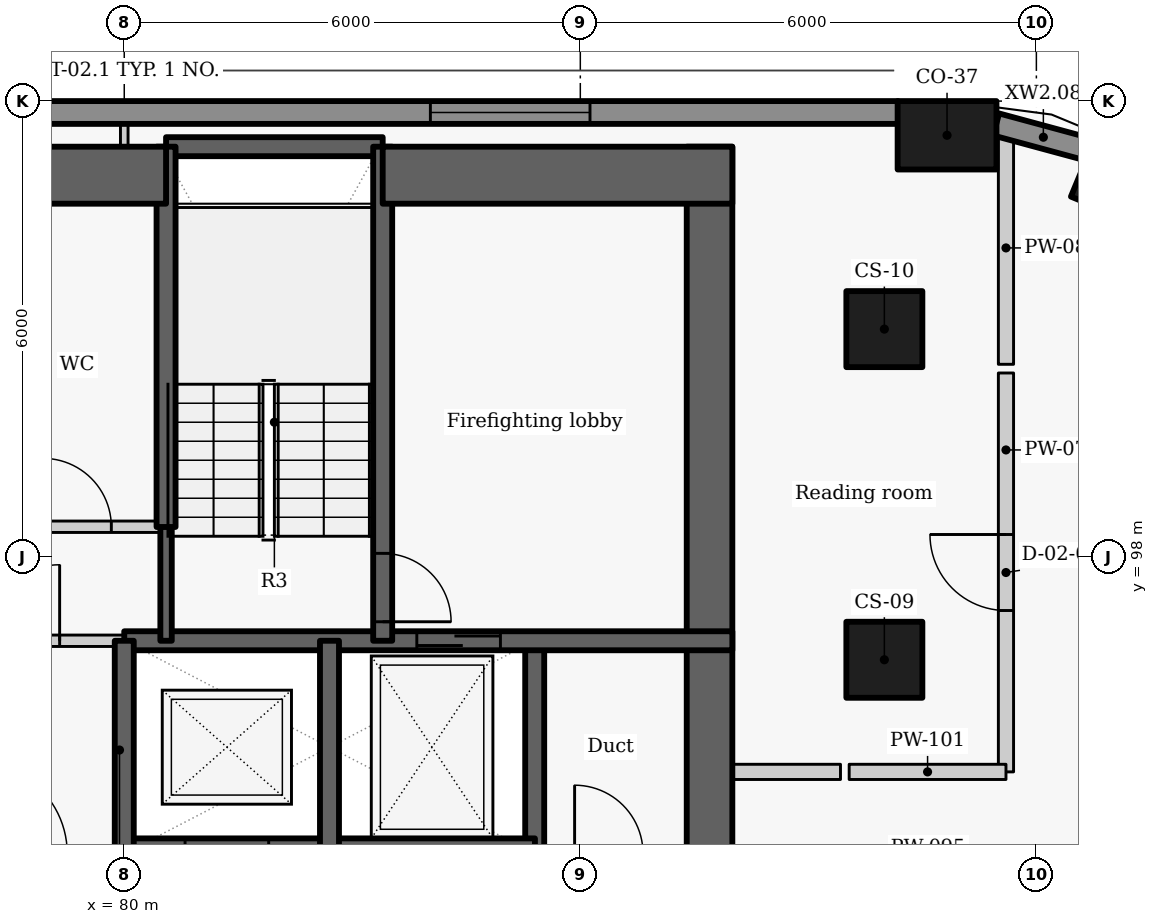
"""IFC4 building model, lengths in metres.
Left out: names, types, materials, properties, quantities, classifications, styles, units other than length and angle.
Written with IfcOpenShell. Run it as: python <this file> out.ifc"""

import sys

from ifc_helpers import new_model, si_unit, direction, frame, frame_2d, origin, origin_2d, place, context, subcontext, project, spatial, rectangle, extrude, element, fill, save


model = new_model("IFC4")
c1 = context("Model", 3, precision=1e-05, world=origin(), true_north=direction((0.0, 1.0)))
c2 = subcontext(c1, "Body", "Model", "MODEL_VIEW")
j1 = project(units=[si_unit("LENGTHUNIT", "METRE"), si_unit("PLANEANGLEUNIT", "RADIAN")], contexts=[c1])
p1 = place(None, origin())
s1 = spatial("IfcSite", under=j1, at=p1, CompositionType="ELEMENT")
p2 = place(p1, origin())
s2 = spatial("IfcBuilding", under=s1, at=p2, CompositionType="ELEMENT")
p3 = place(p2, frame((0.0, 0.0, 166.8)))
s3 = spatial("IfcBuildingStorey", under=s2, at=p3, CompositionType="ELEMENT", Elevation=166.8)
for number, where, z_axis, x_axis in (
    (1, (93.227, 102.91, 0.0), (0.0, 0.0, 1.0), (-0.924, 0.383, 0.0)),
    (2, (90.825, 103.55, 0.0), (0.0, 0.0, 1.0), (-1.0, 0.0, 0.0)),
):
    element("IfcColumn", number, at=place(p3, frame(where, z_axis=z_axis, x_axis=x_axis)), inside=s3, PredefinedType="COLUMN", context=c2, shape_type="SweptSolid", body=[
        extrude(rectangle(XDim=1.3, YDim=0.9, at=origin_2d()), origin(), (0.0, 0.0, 1.0), 3.3),
    ])
for number, where, z_axis, x_axis in (
    (3, (90.0, 96.65, 0.0), (0.0, 0.0, 1.0), (0.0, 1.0, 0.0)),
    (4, (90.0, 101.0, 0.0), (0.0, 0.0, 1.0), (0.0, 1.0, 0.0)),
):
    element("IfcColumn", number, at=place(p3, frame(where, z_axis=z_axis, x_axis=x_axis)), inside=s3, PredefinedType="COLUMN", context=c2, shape_type="SweptSolid", body=[
        extrude(rectangle(XDim=1.0, YDim=1.0, at=origin_2d()), origin(), (0.0, 0.0, 1.0), 3.3),
    ])
p4 = place(p3, frame((92.713, 103.356, 0.0), z_axis=(0.0, 0.0, 1.0), x_axis=(-0.965274225809, 0.26123872031, 0.0)))
e5 = element("IfcWall", 5, at=p4, inside=s3, PredefinedType="SOLIDWALL", context=c2, shape_type="SweptSolid", body=[
    extrude(rectangle(XDim=1.287, YDim=0.3, at=frame_2d((0.644, 0.0))), origin(), (0.0, 0.0, 1.0), 2.05),
])
p5 = place(p3, frame((90.179, 103.85, 0.0), z_axis=(0.0, 0.0, 1.0), x_axis=(-1.0, 0.0, 0.0)))
e6 = element("IfcWall", 6, at=p5, inside=s3, PredefinedType="SOLIDWALL", context=c2, shape_type="SweptSolid", body=[
    extrude(rectangle(XDim=20.391, YDim=0.3, at=frame_2d((10.196, 0.0))), origin(), (0.0, 0.0, 1.0), 2.05),
])
p6 = place(p5, frame((4.051, 0.0, 0.9)))
e7 = element("IfcOpeningElement", 7, at=p6, cuts=e6, PredefinedType="OPENING", context=c2, shape_type="SweptSolid", body=[
    extrude(rectangle(XDim=2.1, YDim=1.1, at=frame_2d((1.05, 0.55))), frame((0.0, 0.16, 0.0), z_axis=(0.0, -1.0, 0.0), x_axis=(1.0, 0.0, 0.0)), (0.0, 0.0, 1.0), 0.32),
])
p7 = place(p5, frame((14.212, 0.0, 0.9)))
e8 = element("IfcOpeningElement", 8, at=p7, cuts=e6, PredefinedType="OPENING", context=c2, shape_type="SweptSolid", body=[
    extrude(rectangle(XDim=2.1, YDim=1.1, at=frame_2d((1.05, 0.55))), frame((0.0, 0.16, 0.0), z_axis=(0.0, -1.0, 0.0), x_axis=(1.0, 0.0, 0.0)), (0.0, 0.0, 1.0), 0.32),
])
p8 = place(p3, frame((85.4, 94.1, -0.275), z_axis=(0.0, 0.0, 1.0), x_axis=(0.0, 1.0, 0.0)))
e9 = element("IfcWall", 9, at=p8, inside=s3, PredefinedType="SHEAR", context=c2, shape_type="SweptSolid", body=[
    extrude(rectangle(XDim=2.8, YDim=0.25, at=frame_2d((1.4, 0.0))), origin(), (0.0, 0.0, 1.0), 3.225),
])
p9 = place(p3, frame((87.7, 103.4, -0.275), z_axis=(0.0, 0.0, 1.0), x_axis=(0.0, -1.0, 0.0)))
e10 = element("IfcWall", 10, at=p9, inside=s3, PredefinedType="SHEAR", context=c2, shape_type="SweptSolid", body=[
    extrude(rectangle(XDim=15.6, YDim=0.6, at=frame_2d((7.8, 0.0))), origin(), (0.0, 0.0, 1.0), 3.225),
])
p10 = place(p9, frame((10.248, 0.0, 0.275)))
e11 = element("IfcOpeningElement", 11, at=p10, cuts=e10, PredefinedType="OPENING", context=c2, shape_type="SweptSolid", body=[
    extrude(rectangle(XDim=1.5, YDim=2.1, at=frame_2d((0.75, 1.05))), frame((0.0, 0.31, 0.0), z_axis=(0.0, -1.0, 0.0), x_axis=(1.0, 0.0, 0.0)), (0.0, 0.0, 1.0), 0.62),
])
p11 = place(p3, frame((79.997, 94.1, -0.275), z_axis=(0.0, 0.0, 1.0), x_axis=(1.0, 0.0, 0.0)))
e12 = element("IfcWall", 12, at=p11, inside=s3, PredefinedType="SHEAR", context=c2, shape_type="SweptSolid", body=[
    extrude(rectangle(XDim=5.406, YDim=0.4, at=frame_2d((2.703, 0.0))), origin(), (0.0, 0.0, 1.0), 3.225),
])
p12 = place(p11, frame((0.803, 0.0, 0.275)))
e13 = element("IfcOpeningElement", 13, at=p12, cuts=e12, PredefinedType="OPENING", context=c2, shape_type="SweptSolid", body=[
    extrude(rectangle(XDim=1.1, YDim=2.1, at=frame_2d((0.55, 1.05))), frame((0.0, 0.21, 0.0), z_axis=(0.0, -1.0, 0.0), x_axis=(1.0, 0.0, 0.0)), (0.0, 0.0, 1.0), 0.42),
])
p13 = place(p3, frame((80.0, 96.9, -0.275), z_axis=(0.0, 0.0, 1.0), x_axis=(1.0, 0.0, 0.0)))
e14 = element("IfcWall", 14, at=p13, inside=s3, PredefinedType="SHEAR", context=c2, shape_type="SweptSolid", body=[
    extrude(rectangle(XDim=8.0, YDim=0.25, at=frame_2d((4.0, 0.0))), origin(), (0.0, 0.0, 1.0), 3.225),
])
p14 = place(p13, frame((3.849, 0.0, 0.275)))
e15 = element("IfcOpeningElement", 15, at=p14, cuts=e14, PredefinedType="OPENING", context=c2, shape_type="SweptSolid", body=[
    extrude(rectangle(XDim=1.1, YDim=2.1, at=frame_2d((0.55, 1.05))), frame((0.0, 0.135, 0.0), z_axis=(0.0, -1.0, 0.0), x_axis=(1.0, 0.0, 0.0)), (0.0, 0.0, 1.0), 0.27),
])
p15 = place(p3, frame((80.0, 94.1, -0.275), z_axis=(0.0, 0.0, 1.0), x_axis=(0.0, 1.0, 0.0)))
e16 = element("IfcWall", 16, at=p15, inside=s3, PredefinedType="SHEAR", context=c2, shape_type="SweptSolid", body=[
    extrude(rectangle(XDim=2.8, YDim=0.25, at=frame_2d((1.4, 0.0))), origin(), (0.0, 0.0, 1.0), 3.225),
])
p16 = place(p3, frame((77.3, 96.9, 0.0), z_axis=(0.0, 0.0, 1.0), x_axis=(1.0, 0.0, 0.0)))
e17 = element("IfcWall", 17, at=p16, inside=s3, PredefinedType="PARTITIONING", context=c2, shape_type="SweptSolid", body=[
    extrude(rectangle(XDim=2.7, YDim=0.15, at=frame_2d((1.35, 0.0))), origin(), (0.0, 0.0, 1.0), 2.95),
])
p17 = place(p16, frame((0.85, 0.0, 0.0)))
e18 = element("IfcOpeningElement", 18, at=p17, cuts=e17, PredefinedType="OPENING", context=c2, shape_type="SweptSolid", body=[
    extrude(rectangle(XDim=1.0, YDim=2.1, at=frame_2d((0.5, 1.05))), frame((0.0, 0.085, 0.0), z_axis=(0.0, -1.0, 0.0), x_axis=(1.0, 0.0, 0.0)), (0.0, 0.0, 1.0), 0.17),
])
p18 = place(p3, frame((82.7, 94.1, -0.275), z_axis=(0.0, 0.0, 1.0), x_axis=(0.0, 1.0, 0.0)))
e19 = element("IfcWall", 19, at=p18, inside=s3, PredefinedType="SHEAR", context=c2, shape_type="SweptSolid", body=[
    extrude(rectangle(XDim=2.8, YDim=0.25, at=frame_2d((1.4, 0.0))), origin(), (0.0, 0.0, 1.0), 3.225),
])
p19 = place(p3, frame((80.55, 103.4, -0.275), z_axis=(0.0, 0.0, 1.0), x_axis=(1.0, 0.0, 0.0)))
e20 = element("IfcWall", 20, at=p19, inside=s3, PredefinedType="SHEAR", context=c2, shape_type="SweptSolid", body=[
    extrude(rectangle(XDim=2.85, YDim=0.25, at=frame_2d((1.425, 0.0))), origin(), (0.0, 0.0, 1.0), 3.225),
])
p20 = place(p3, frame((83.4, 103.4, -0.275), z_axis=(0.0, 0.0, 1.0), x_axis=(0.0, -1.0, 0.0)))
e21 = element("IfcWall", 21, at=p20, inside=s3, PredefinedType="SHEAR", context=c2, shape_type="SweptSolid", body=[
    extrude(rectangle(XDim=6.5, YDim=0.25, at=frame_2d((3.25, 0.0))), origin(), (0.0, 0.0, 1.0), 3.225),
])
p21 = place(p20, frame((5.35, 0.0, 0.275)))
e22 = element("IfcOpeningElement", 22, at=p21, cuts=e21, PredefinedType="OPENING", context=c2, shape_type="SweptSolid", body=[
    extrude(rectangle(XDim=0.9, YDim=2.1, at=frame_2d((0.45, 1.05))), frame((0.0, 0.135, 0.0), z_axis=(0.0, -1.0, 0.0), x_axis=(1.0, 0.0, 0.0)), (0.0, 0.0, 1.0), 0.27),
])
p22 = place(p3, frame((80.55, 96.9, -0.275), z_axis=(0.0, 0.0, 1.0), x_axis=(0.0, 1.0, 0.0)))
e23 = element("IfcWall", 23, at=p22, inside=s3, PredefinedType="SHEAR", context=c2, shape_type="SweptSolid", body=[
    extrude(rectangle(XDim=1.503, YDim=0.15, at=frame_2d((0.751, 0.0))), origin(), (0.0, 0.0, 1.0), 3.225),
])
p23 = place(p3, frame((80.55, 98.397, -0.275), z_axis=(0.0, 0.0, 1.0), x_axis=(0.0, 1.0, 0.0)))
e24 = element("IfcWall", 24, at=p23, inside=s3, PredefinedType="SHEAR", context=c2, shape_type="SweptSolid", body=[
    extrude(rectangle(XDim=5.003, YDim=0.25, at=frame_2d((2.501, 0.0))), origin(), (0.0, 0.0, 1.0), 3.225),
])
p24 = place(p3, frame((75.35, 103.025, -0.275), z_axis=(0.0, 0.0, 1.0), x_axis=(1.0, 0.0, 0.0)))
e25 = element("IfcWall", 25, at=p24, inside=s3, PredefinedType="SHEAR", context=c2, shape_type="SweptSolid", body=[
    extrude(rectangle(XDim=5.2, YDim=0.75, at=frame_2d((2.6, 0.0))), origin(), (0.0, 0.0, 1.0), 3.225),
])
p25 = place(p3, frame((83.4, 103.025, -0.275), z_axis=(0.0, 0.0, 1.0), x_axis=(1.0, 0.0, 0.0)))
e26 = element("IfcWall", 26, at=p25, inside=s3, PredefinedType="SHEAR", context=c2, shape_type="SweptSolid", body=[
    extrude(rectangle(XDim=4.6, YDim=0.75, at=frame_2d((2.3, 0.0))), origin(), (0.0, 0.0, 1.0), 3.225),
])
p26 = place(p3, frame((75.35, 98.4, 0.0), z_axis=(0.0, 0.0, 1.0), x_axis=(1.0, 0.0, 0.0)))
e27 = element("IfcWall", 27, at=p26, inside=s3, PredefinedType="PARTITIONING", context=c2, shape_type="SweptSolid", body=[
    extrude(rectangle(XDim=5.2, YDim=0.15, at=frame_2d((2.6, 0.0))), origin(), (0.0, 0.0, 1.0), 2.95),
])
p27 = place(p26, frame((0.2, 0.0, 0.0)))
e28 = element("IfcOpeningElement", 28, at=p27, cuts=e27, PredefinedType="OPENING", context=c2, shape_type="SweptSolid", body=[
    extrude(rectangle(XDim=0.9, YDim=2.1, at=frame_2d((0.45, 1.05))), frame((0.0, 0.085, 0.0), z_axis=(0.0, -1.0, 0.0), x_axis=(1.0, 0.0, 0.0)), (0.0, 0.0, 1.0), 0.17),
])
p28 = place(p26, frame((1.63, 0.0, 0.0)))
e29 = element("IfcOpeningElement", 29, at=p28, cuts=e27, PredefinedType="OPENING", context=c2, shape_type="SweptSolid", body=[
    extrude(rectangle(XDim=0.9, YDim=2.1, at=frame_2d((0.45, 1.05))), frame((0.0, 0.085, 0.0), z_axis=(0.0, -1.0, 0.0), x_axis=(1.0, 0.0, 0.0)), (0.0, 0.0, 1.0), 0.17),
])
p29 = place(p26, frame((3.58, 0.0, 0.0)))
e30 = element("IfcOpeningElement", 30, at=p29, cuts=e27, PredefinedType="OPENING", context=c2, shape_type="SweptSolid", body=[
    extrude(rectangle(XDim=0.9, YDim=2.1, at=frame_2d((0.45, 1.05))), frame((0.0, 0.085, 0.0), z_axis=(0.0, -1.0, 0.0), x_axis=(1.0, 0.0, 0.0)), (0.0, 0.0, 1.0), 0.17),
])
p30 = place(p3, frame((91.6, 95.175, 0.0), z_axis=(0.0, 0.0, 1.0), x_axis=(0.0, 1.0, 0.0)))
e31 = element("IfcWall", 31, at=p30, inside=s3, PredefinedType="PARTITIONING", context=c2, shape_type="SweptSolid", body=[
    extrude(rectangle(XDim=5.248, YDim=0.2, at=frame_2d((2.624, 0.0))), origin(), (0.0, 0.0, 1.0), 2.95),
])
p31 = place(p30, frame((2.123, 0.0, 0.0)))
e32 = element("IfcOpeningElement", 32, at=p31, cuts=e31, PredefinedType="OPENING", context=c2, shape_type="SweptSolid", body=[
    extrude(rectangle(XDim=1.0, YDim=2.1, at=frame_2d((0.5, 1.05))), frame((0.0, 0.11, 0.0), z_axis=(0.0, -1.0, 0.0), x_axis=(1.0, 0.0, 0.0)), (0.0, 0.0, 1.0), 0.22),
])
p32 = place(p3, frame((91.6, 100.537, 0.0), z_axis=(0.0, 0.0, 1.0), x_axis=(0.0, 1.0, 0.0)))
e33 = element("IfcWall", 33, at=p32, inside=s3, PredefinedType="PARTITIONING", context=c2, shape_type="SweptSolid", body=[
    extrude(rectangle(XDim=3.062, YDim=0.2, at=frame_2d((1.531, 0.0))), origin(), (0.0, 0.0, 1.0), 2.03),
])
p33 = place(p3, frame((88.0, 95.175, 0.0), z_axis=(0.0, 0.0, 1.0), x_axis=(1.0, 0.0, 0.0)))
e34 = element("IfcWall", 34, at=p33, inside=s3, PredefinedType="PARTITIONING", context=c2, shape_type="SweptSolid", body=[
    extrude(rectangle(XDim=1.423, YDim=0.2, at=frame_2d((0.711, 0.0))), origin(), (0.0, 0.0, 1.0), 2.95),
])
p34 = place(p3, frame((89.537, 95.175, 0.0), z_axis=(0.0, 0.0, 1.0), x_axis=(1.0, 0.0, 0.0)))
e35 = element("IfcWall", 35, at=p34, inside=s3, PredefinedType="PARTITIONING", context=c2, shape_type="SweptSolid", body=[
    extrude(rectangle(XDim=2.063, YDim=0.2, at=frame_2d((1.031, 0.0))), origin(), (0.0, 0.0, 1.0), 2.43),
])
p35 = place(p3, frame((80.0, 103.4, 0.0), z_axis=(0.0, 0.0, 1.0), x_axis=(0.0, 1.0, 0.0)))
e36 = element("IfcWall", 36, at=p35, inside=s3, PredefinedType="PARTITIONING", context=c2, shape_type="SweptSolid", body=[
    extrude(rectangle(XDim=0.3, YDim=0.1, at=frame_2d((0.15, 0.0))), origin(), (0.0, 0.0, 1.0), 2.95),
])
p36 = place(p6, origin())
e37 = element("IfcWindow", 37, at=p36, inside=s3, PartitioningType="SINGLE_PANEL", PredefinedType="WINDOW", context=c2, shape_type="SweptSolid", body=[
    extrude(rectangle(XDim=2.1, YDim=1.1, at=frame_2d((1.05, 0.55))), frame((0.0, 0.03, 0.0), z_axis=(0.0, -1.0, 0.0), x_axis=(1.0, 0.0, 0.0)), (0.0, 0.0, 1.0), 0.06),
])
fill(e7, e37)
p37 = place(p14, origin())
e38 = element("IfcDoor", 38, at=p37, inside=s3, OperationType="SLIDING_TO_LEFT", PredefinedType="DOOR", context=c2, shape_type="SweptSolid", body=[
    extrude(rectangle(XDim=1.1, YDim=2.1, at=frame_2d((0.55, 1.05))), frame((0.0, 0.025, 0.0), z_axis=(0.0, -1.0, 0.0), x_axis=(1.0, 0.0, 0.0)), (0.0, 0.0, 1.0), 0.05),
])
fill(e15, e38)
p38 = place(p17, origin())
e39 = element("IfcDoor", 39, at=p38, inside=s3, OperationType="SINGLE_SWING_RIGHT", PredefinedType="DOOR", context=c2, shape_type="SweptSolid", body=[
    extrude(rectangle(XDim=1.0, YDim=2.1, at=frame_2d((0.5, 1.05))), frame((0.0, 0.025, 0.0), z_axis=(0.0, -1.0, 0.0), x_axis=(1.0, 0.0, 0.0)), (0.0, 0.0, 1.0), 0.05),
])
fill(e18, e39)
p39 = place(p29, origin())
e40 = element("IfcDoor", 40, at=p39, inside=s3, OperationType="SINGLE_SWING_LEFT", PredefinedType="DOOR", context=c2, shape_type="SweptSolid", body=[
    extrude(rectangle(XDim=0.9, YDim=2.1, at=frame_2d((0.45, 1.05))), frame((0.0, 0.025, 0.0), z_axis=(0.0, -1.0, 0.0), x_axis=(1.0, 0.0, 0.0)), (0.0, 0.0, 1.0), 0.05),
])
fill(e30, e40)
p40 = place(p21, origin())
e41 = element("IfcDoor", 41, at=p40, inside=s3, OperationType="SINGLE_SWING_RIGHT", PredefinedType="DOOR", context=c2, shape_type="SweptSolid", body=[
    extrude(rectangle(XDim=0.9, YDim=2.1, at=frame_2d((0.45, 1.05))), frame((0.0, 0.025, 0.0), z_axis=(0.0, -1.0, 0.0), x_axis=(1.0, 0.0, 0.0)), (0.0, 0.0, 1.0), 0.05),
])
fill(e22, e41)
p41 = place(p31, origin())
e42 = element("IfcDoor", 42, at=p41, inside=s3, OperationType="SINGLE_SWING_RIGHT", PredefinedType="DOOR", context=c2, shape_type="SweptSolid", body=[
    extrude(rectangle(XDim=1.0, YDim=2.1, at=frame_2d((0.5, 1.05))), frame((0.0, 0.025, 0.0), z_axis=(0.0, -1.0, 0.0), x_axis=(1.0, 0.0, 0.0)), (0.0, 0.0, 1.0), 0.05),
])
fill(e32, e42)
save(model, sys.argv[1])
